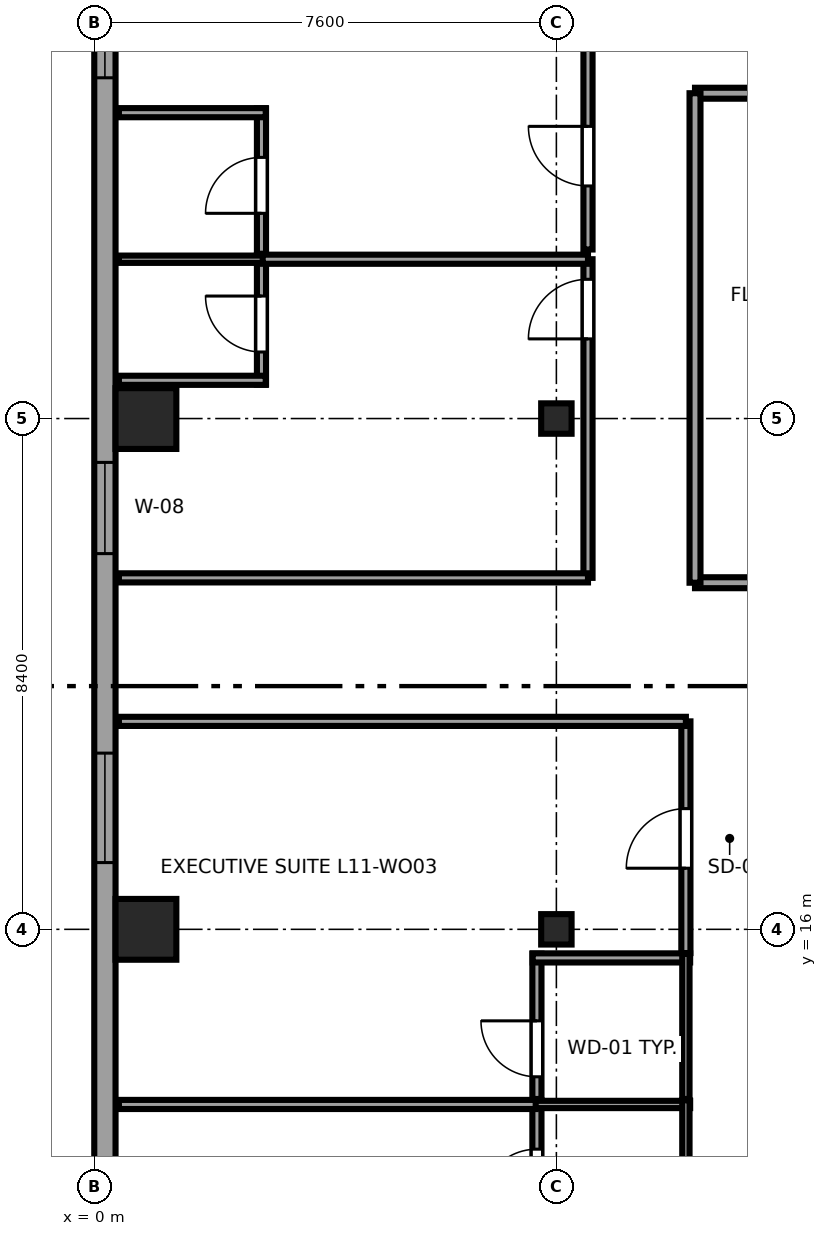
"""IFC4 building model, lengths in metres.
Left out: names, types, materials, properties, quantities, classifications, styles, units other than length and angle.
Written with IfcOpenShell. Run it as: python <this file> out.ifc"""

import sys

from ifc_helpers import new_model, si_unit, direction, frame, frame_2d, origin, origin_2d, place, context, subcontext, project, spatial, rectangle, i_section, extrude, source, transform, mapped, element, fill, save


model = new_model("IFC4")
c1 = context("Model", 3, precision=1e-05, world=origin(), true_north=direction((0.0, 1.0)))
c2 = subcontext(c1, "Body", "Model", "MODEL_VIEW")
j1 = project(units=[si_unit("LENGTHUNIT", "METRE"), si_unit("PLANEANGLEUNIT", "RADIAN")], contexts=[c1])
p1 = place(None, origin())
s1 = spatial("IfcSite", under=j1, at=p1, CompositionType="ELEMENT")
p2 = place(p1, origin())
s2 = spatial("IfcBuilding", under=s1, at=p2, CompositionType="ELEMENT")
p3 = place(p2, frame((0.0, 0.0, 49.75)))
s3 = spatial("IfcBuildingStorey", under=s2, at=p3, CompositionType="ELEMENT", Elevation=49.75)
m1 = source(origin(), c2, "Body", "SweptSolid", [
    extrude(rectangle(XDim=1.0, YDim=1.0, at=origin_2d()), origin(), (0.0, 0.0, 1.0), 3.55),
])
for number, where, z_axis, x_axis in (
    (1, (0.85, 16.0, 0.0), (0.0, 0.0, 1.0), (1.0, 0.0, 0.0)),
    (2, (0.85, 24.4, 0.0), (0.0, 0.0, 1.0), (1.0, 0.0, 0.0)),
):
    element("IfcColumn", number, at=place(p3, frame(where, z_axis=z_axis, x_axis=x_axis)), inside=s3, PredefinedType="COLUMN", context=c2, shape_type="MappedRepresentation", body=[
        mapped(m1, transform((0.0, 0.0, 0.0), x_axis=(1.0, 0.0, 0.0), y_axis=(0.0, 1.0, 0.0), z_axis=(0.0, 0.0, 1.0), scale=1.0)),
    ])
m2 = source(origin(), c2, "Body", "SweptSolid", [
    extrude(i_section(OverallWidth=0.5, OverallDepth=0.5, WebThickness=0.028, FlangeThickness=0.045, at=origin_2d()), origin(), (0.0, 0.0, 1.0), 3.55),
])
for number, where, z_axis, x_axis in (
    (3, (7.6, 16.0, 0.0), (0.0, 0.0, 1.0), (1.0, 0.0, 0.0)),
    (4, (7.6, 24.4, 0.0), (0.0, 0.0, 1.0), (1.0, 0.0, 0.0)),
):
    element("IfcColumn", number, at=place(p3, frame(where, z_axis=z_axis, x_axis=x_axis)), inside=s3, PredefinedType="COLUMN", context=c2, shape_type="MappedRepresentation", body=[
        mapped(m2, transform((0.0, 0.0, 0.0), x_axis=(1.0, 0.0, 0.0), y_axis=(0.0, 1.0, 0.0), z_axis=(0.0, 0.0, 1.0), scale=1.0)),
    ])
p4 = place(p3, frame((0.175, 41.383, 0.0), z_axis=(0.0, 0.0, 1.0), x_axis=(0.0, -1.0, 0.0)))
e5 = element("IfcWall", 5, at=p4, inside=s3, PredefinedType="SOLIDWALL", context=c2, shape_type="SweptSolid", body=[
    extrude(rectangle(XDim=36.766, YDim=0.35, at=frame_2d((18.383, 0.0))), origin(), (0.0, 0.0, 1.0), 3.37),
])
p5 = place(p4, frame((1.676, 0.0, 0.68)))
e6 = element("IfcOpeningElement", 6, at=p5, cuts=e5, PredefinedType="OPENING", context=c2, shape_type="SweptSolid", body=[
    extrude(rectangle(XDim=1.8, YDim=1.85, at=frame_2d((0.9, 0.925))), frame((0.0, 0.185, 0.0), z_axis=(0.0, -1.0, 0.0), x_axis=(1.0, 0.0, 0.0)), (0.0, 0.0, 1.0), 0.37),
])
p6 = place(p4, frame((4.578, 0.0, 0.68)))
e7 = element("IfcOpeningElement", 7, at=p6, cuts=e5, PredefinedType="OPENING", context=c2, shape_type="SweptSolid", body=[
    extrude(rectangle(XDim=1.8, YDim=1.85, at=frame_2d((0.9, 0.925))), frame((0.0, 0.185, 0.0), z_axis=(0.0, -1.0, 0.0), x_axis=(1.0, 0.0, 0.0)), (0.0, 0.0, 1.0), 0.37),
])
p7 = place(p4, frame((9.579, 0.0, 0.68)))
e8 = element("IfcOpeningElement", 8, at=p7, cuts=e5, PredefinedType="OPENING", context=c2, shape_type="SweptSolid", body=[
    extrude(rectangle(XDim=1.8, YDim=1.85, at=frame_2d((0.9, 0.925))), frame((0.0, 0.185, 0.0), z_axis=(0.0, -1.0, 0.0), x_axis=(1.0, 0.0, 0.0)), (0.0, 0.0, 1.0), 0.37),
])
p8 = place(p4, frame((22.485, 0.0, 0.68)))
e9 = element("IfcOpeningElement", 9, at=p8, cuts=e5, PredefinedType="OPENING", context=c2, shape_type="SweptSolid", body=[
    extrude(rectangle(XDim=1.8, YDim=1.85, at=frame_2d((0.9, 0.925))), frame((0.0, 0.185, 0.0), z_axis=(0.0, -1.0, 0.0), x_axis=(1.0, 0.0, 0.0)), (0.0, 0.0, 1.0), 0.37),
])
p9 = place(p4, frame((29.338, 0.0, 0.68)))
e10 = element("IfcOpeningElement", 10, at=p9, cuts=e5, PredefinedType="OPENING", context=c2, shape_type="SweptSolid", body=[
    extrude(rectangle(XDim=1.8, YDim=1.85, at=frame_2d((0.9, 0.925))), frame((0.0, 0.185, 0.0), z_axis=(0.0, -1.0, 0.0), x_axis=(1.0, 0.0, 0.0)), (0.0, 0.0, 1.0), 0.37),
])
p10 = place(p4, frame((34.879, 0.0, 0.62)))
e11 = element("IfcOpeningElement", 11, at=p10, cuts=e5, PredefinedType="OPENING", context=c2, shape_type="SweptSolid", body=[
    extrude(rectangle(XDim=1.5, YDim=1.55, at=frame_2d((0.75, 0.775))), frame((0.0, 0.185, 0.0), z_axis=(0.0, -1.0, 0.0), x_axis=(1.0, 0.0, 0.0)), (0.0, 0.0, 1.0), 0.37),
])
p11 = place(p4, frame((17.704, 0.0, 0.62)))
e12 = element("IfcOpeningElement", 12, at=p11, cuts=e5, PredefinedType="OPENING", context=c2, shape_type="SweptSolid", body=[
    extrude(rectangle(XDim=1.5, YDim=1.55, at=frame_2d((0.75, 0.775))), frame((0.0, 0.185, 0.0), z_axis=(0.0, -1.0, 0.0), x_axis=(1.0, 0.0, 0.0)), (0.0, 0.0, 1.0), 0.37),
])
p12 = place(p3, frame((7.28, 10.8, 0.0), z_axis=(0.0, 0.0, 1.0), x_axis=(0.0, 1.0, 0.0)))
e13 = element("IfcWall", 13, at=p12, inside=s3, PredefinedType="PARTITIONING", context=c2, shape_type="SweptSolid", body=[
    extrude(rectangle(XDim=2.39, YDim=0.15, at=frame_2d((1.195, 0.0))), origin(), (0.0, 0.0, 1.0), 3.37),
])
p13 = place(p12, frame((0.665, 0.0, 0.0)))
e14 = element("IfcOpeningElement", 14, at=p13, cuts=e13, PredefinedType="OPENING", context=c2, shape_type="SweptSolid", body=[
    extrude(rectangle(XDim=0.92, YDim=2.01, at=frame_2d((0.46, 1.005))), frame((0.0, 0.085, 0.0), z_axis=(0.0, -1.0, 0.0), x_axis=(1.0, 0.0, 0.0)), (0.0, 0.0, 1.0), 0.17),
])
p14 = place(p3, frame((7.21, 13.12, 0.0), z_axis=(0.0, 0.0, 1.0), x_axis=(1.0, 0.0, 0.0)))
e15 = element("IfcWall", 15, at=p14, inside=s3, PredefinedType="PLUMBINGWALL", context=c2, shape_type="SweptSolid", body=[
    extrude(rectangle(XDim=2.59, YDim=0.12, at=frame_2d((1.295, 0.0))), origin(), (0.0, 0.0, 1.0), 3.37),
])
p15 = place(p3, frame((9.73, 10.8, 0.0), z_axis=(0.0, 0.0, 1.0), x_axis=(0.0, 1.0, 0.0)))
e16 = element("IfcWall", 16, at=p15, inside=s3, PredefinedType="PLUMBINGWALL", context=c2, shape_type="SweptSolid", body=[
    extrude(rectangle(XDim=2.39, YDim=0.12, at=frame_2d((1.195, 0.0))), origin(), (0.0, 0.0, 1.0), 3.37),
])
p16 = place(p3, frame((7.28, 13.21, 0.0), z_axis=(0.0, 0.0, 1.0), x_axis=(0.0, 1.0, 0.0)))
e17 = element("IfcWall", 17, at=p16, inside=s3, PredefinedType="PARTITIONING", context=c2, shape_type="SweptSolid", body=[
    extrude(rectangle(XDim=2.39, YDim=0.15, at=frame_2d((1.195, 0.0))), origin(), (0.0, 0.0, 1.0), 3.37),
])
p17 = place(p16, frame((0.365, 0.0, 0.0)))
e18 = element("IfcOpeningElement", 18, at=p17, cuts=e17, PredefinedType="OPENING", context=c2, shape_type="SweptSolid", body=[
    extrude(rectangle(XDim=0.92, YDim=2.01, at=frame_2d((0.46, 1.005))), frame((0.0, 0.085, 0.0), z_axis=(0.0, -1.0, 0.0), x_axis=(1.0, 0.0, 0.0)), (0.0, 0.0, 1.0), 0.17),
])
p18 = place(p3, frame((7.21, 15.53, 0.0), z_axis=(0.0, 0.0, 1.0), x_axis=(1.0, 0.0, 0.0)))
e19 = element("IfcWall", 19, at=p18, inside=s3, PredefinedType="PARTITIONING", context=c2, shape_type="SweptSolid", body=[
    extrude(rectangle(XDim=2.59, YDim=0.15, at=frame_2d((1.295, 0.0))), origin(), (0.0, 0.0, 1.0), 3.37),
])
p19 = place(p3, frame((9.73, 13.21, 0.0), z_axis=(0.0, 0.0, 1.0), x_axis=(0.0, 1.0, 0.0)))
e20 = element("IfcWall", 20, at=p19, inside=s3, PredefinedType="PLUMBINGWALL", context=c2, shape_type="SweptSolid", body=[
    extrude(rectangle(XDim=2.39, YDim=0.12, at=frame_2d((1.195, 0.0))), origin(), (0.0, 0.0, 1.0), 3.37),
])
p20 = place(p3, frame((2.75, 24.959, 0.0), z_axis=(0.0, 0.0, 1.0), x_axis=(0.0, 1.0, 0.0)))
e21 = element("IfcWall", 21, at=p20, inside=s3, PredefinedType="PARTITIONING", context=c2, shape_type="SweptSolid", body=[
    extrude(rectangle(XDim=2.131, YDim=0.15, at=frame_2d((1.065, 0.0))), origin(), (0.0, 0.0, 1.0), 3.37),
])
p21 = place(p20, frame((0.535, 0.0, 0.0)))
e22 = element("IfcOpeningElement", 22, at=p21, cuts=e21, PredefinedType="OPENING", context=c2, shape_type="SweptSolid", body=[
    extrude(rectangle(XDim=0.92, YDim=2.01, at=frame_2d((0.46, 1.005))), frame((0.0, 0.085, 0.0), z_axis=(0.0, -1.0, 0.0), x_axis=(1.0, 0.0, 0.0)), (0.0, 0.0, 1.0), 0.17),
])
p22 = place(p3, frame((0.405, 25.029, 0.0), z_axis=(0.0, 0.0, 1.0), x_axis=(1.0, 0.0, 0.0)))
e23 = element("IfcWall", 23, at=p22, inside=s3, PredefinedType="PARTITIONING", context=c2, shape_type="SweptSolid", body=[
    extrude(rectangle(XDim=2.415, YDim=0.15, at=frame_2d((1.208, 0.0))), origin(), (0.0, 0.0, 1.0), 3.37),
])
p23 = place(p3, frame((0.405, 27.02, 0.0), z_axis=(0.0, 0.0, 1.0), x_axis=(1.0, 0.0, 0.0)))
e24 = element("IfcWall", 24, at=p23, inside=s3, PredefinedType="PLUMBINGWALL", context=c2, shape_type="SweptSolid", body=[
    extrude(rectangle(XDim=2.415, YDim=0.12, at=frame_2d((1.208, 0.0))), origin(), (0.0, 0.0, 1.0), 3.37),
])
p24 = place(p3, frame((2.75, 27.11, 0.0), z_axis=(0.0, 0.0, 1.0), x_axis=(0.0, 1.0, 0.0)))
e25 = element("IfcWall", 25, at=p24, inside=s3, PredefinedType="PARTITIONING", context=c2, shape_type="SweptSolid", body=[
    extrude(rectangle(XDim=2.39, YDim=0.15, at=frame_2d((1.195, 0.0))), origin(), (0.0, 0.0, 1.0), 3.37),
])
p25 = place(p24, frame((0.665, 0.0, 0.0)))
e26 = element("IfcOpeningElement", 26, at=p25, cuts=e25, PredefinedType="OPENING", context=c2, shape_type="SweptSolid", body=[
    extrude(rectangle(XDim=0.92, YDim=2.01, at=frame_2d((0.46, 1.005))), frame((0.0, 0.085, 0.0), z_axis=(0.0, -1.0, 0.0), x_axis=(1.0, 0.0, 0.0)), (0.0, 0.0, 1.0), 0.17),
])
p26 = place(p3, frame((0.405, 29.43, 0.0), z_axis=(0.0, 0.0, 1.0), x_axis=(1.0, 0.0, 0.0)))
e27 = element("IfcWall", 27, at=p26, inside=s3, PredefinedType="PARTITIONING", context=c2, shape_type="SweptSolid", body=[
    extrude(rectangle(XDim=2.415, YDim=0.15, at=frame_2d((1.208, 0.0))), origin(), (0.0, 0.0, 1.0), 3.37),
])
p27 = place(p3, frame((0.405, 13.12, 0.0), z_axis=(0.0, 0.0, 1.0), x_axis=(1.0, 0.0, 0.0)))
e28 = element("IfcWall", 28, at=p27, inside=s3, PredefinedType="PARTITIONING", context=c2, shape_type="SweptSolid", body=[
    extrude(rectangle(XDim=6.855, YDim=0.15, at=frame_2d((3.427, 0.0))), origin(), (0.0, 0.0, 1.0), 3.37),
])
p28 = place(p3, frame((9.73, 15.61, 0.0), z_axis=(0.0, 0.0, 1.0), x_axis=(0.0, 1.0, 0.0)))
e29 = element("IfcWall", 29, at=p28, inside=s3, PredefinedType="PARTITIONING", context=c2, shape_type="SweptSolid", body=[
    extrude(rectangle(XDim=3.81, YDim=0.15, at=frame_2d((1.905, 0.0))), origin(), (0.0, 0.0, 1.0), 3.37),
])
p29 = place(p28, frame((1.395, 0.0, 0.0)))
e30 = element("IfcOpeningElement", 30, at=p29, cuts=e29, PredefinedType="OPENING", context=c2, shape_type="SweptSolid", body=[
    extrude(rectangle(XDim=0.98, YDim=2.12, at=frame_2d((0.49, 1.06))), frame((0.0, 0.085, 0.0), z_axis=(0.0, -1.0, 0.0), x_axis=(1.0, 0.0, 0.0)), (0.0, 0.0, 1.0), 0.17),
])
p30 = place(p3, frame((0.405, 19.42, 0.0), z_axis=(0.0, 0.0, 1.0), x_axis=(1.0, 0.0, 0.0)))
e31 = element("IfcWall", 31, at=p30, inside=s3, PredefinedType="PARTITIONING", context=c2, shape_type="SweptSolid", body=[
    extrude(rectangle(XDim=9.325, YDim=0.15, at=frame_2d((4.663, 0.0))), origin(), (0.0, 0.0, 1.0), 3.37),
])
p31 = place(p3, frame((8.12, 21.78, 0.0), z_axis=(0.0, 0.0, 1.0), x_axis=(0.0, 1.0, 0.0)))
e32 = element("IfcWall", 32, at=p31, inside=s3, PredefinedType="PARTITIONING", context=c2, shape_type="SweptSolid", body=[
    extrude(rectangle(XDim=5.24, YDim=0.15, at=frame_2d((2.62, 0.0))), origin(), (0.0, 0.0, 1.0), 3.37),
])
p32 = place(p31, frame((3.93, 0.0, 0.0)))
e33 = element("IfcOpeningElement", 33, at=p32, cuts=e32, PredefinedType="OPENING", context=c2, shape_type="SweptSolid", body=[
    extrude(rectangle(XDim=0.98, YDim=2.12, at=frame_2d((0.49, 1.06))), frame((0.0, 0.085, 0.0), z_axis=(0.0, -1.0, 0.0), x_axis=(1.0, 0.0, 0.0)), (0.0, 0.0, 1.0), 0.17),
])
p33 = place(p3, frame((0.405, 21.78, 0.0), z_axis=(0.0, 0.0, 1.0), x_axis=(1.0, 0.0, 0.0)))
e34 = element("IfcWall", 34, at=p33, inside=s3, PredefinedType="PARTITIONING", context=c2, shape_type="SweptSolid", body=[
    extrude(rectangle(XDim=7.715, YDim=0.15, at=frame_2d((3.857, 0.0))), origin(), (0.0, 0.0, 1.0), 3.37),
])
p34 = place(p3, frame((2.77, 27.02, 0.0), z_axis=(0.0, 0.0, 1.0), x_axis=(1.0, 0.0, 0.0)))
e35 = element("IfcWall", 35, at=p34, inside=s3, PredefinedType="PARTITIONING", context=c2, shape_type="SweptSolid", body=[
    extrude(rectangle(XDim=5.35, YDim=0.15, at=frame_2d((2.675, 0.0))), origin(), (0.0, 0.0, 1.0), 3.37),
])
p35 = place(p3, frame((8.12, 27.18, 0.0), z_axis=(0.0, 0.0, 1.0), x_axis=(0.0, 1.0, 0.0)))
e36 = element("IfcWall", 36, at=p35, inside=s3, PredefinedType="PARTITIONING", context=c2, shape_type="SweptSolid", body=[
    extrude(rectangle(XDim=18.415, YDim=0.15, at=frame_2d((9.208, 0.0))), origin(), (0.0, 0.0, 1.0), 3.37),
])
p36 = place(p35, frame((1.045, 0.0, 0.0)))
e37 = element("IfcOpeningElement", 37, at=p36, cuts=e36, PredefinedType="OPENING", context=c2, shape_type="SweptSolid", body=[
    extrude(rectangle(XDim=0.98, YDim=2.12, at=frame_2d((0.49, 1.06))), frame((0.0, 0.085, 0.0), z_axis=(0.0, -1.0, 0.0), x_axis=(1.0, 0.0, 0.0)), (0.0, 0.0, 1.0), 0.17),
])
p37 = place(p3, frame((9.88, 21.7, 0.0), z_axis=(0.0, 0.0, 1.0), x_axis=(1.0, 0.0, 0.0)))
e38 = element("IfcWall", 38, at=p37, inside=s3, PredefinedType="PARTITIONING", context=c2, shape_type="SweptSolid", body=[
    extrude(rectangle(XDim=4.22, YDim=0.18, at=frame_2d((2.11, 0.0))), origin(), (0.0, 0.0, 1.0), 3.37),
])
p38 = place(p37, frame((1.285, 0.0, 0.0)))
e39 = element("IfcOpeningElement", 39, at=p38, cuts=e38, PredefinedType="OPENING", context=c2, shape_type="SweptSolid", body=[
    extrude(rectangle(XDim=1.65, YDim=2.15, at=frame_2d((0.825, 1.075))), frame((0.0, 0.1, 0.0), z_axis=(0.0, -1.0, 0.0), x_axis=(1.0, 0.0, 0.0)), (0.0, 0.0, 1.0), 0.2),
])
p39 = place(p3, frame((9.88, 29.75, 0.0), z_axis=(0.0, 0.0, 1.0), x_axis=(1.0, 0.0, 0.0)))
e40 = element("IfcWall", 40, at=p39, inside=s3, PredefinedType="PARTITIONING", context=c2, shape_type="SweptSolid", body=[
    extrude(rectangle(XDim=4.22, YDim=0.18, at=frame_2d((2.11, 0.0))), origin(), (0.0, 0.0, 1.0), 3.37),
])
p40 = place(p3, frame((9.88, 21.7, 0.0), z_axis=(0.0, 0.0, 1.0), x_axis=(0.0, 1.0, 0.0)))
e41 = element("IfcWall", 41, at=p40, inside=s3, PredefinedType="PARTITIONING", context=c2, shape_type="SweptSolid", body=[
    extrude(rectangle(XDim=8.05, YDim=0.18, at=frame_2d((4.025, 0.0))), origin(), (0.0, 0.0, 1.0), 3.37),
])
m3 = source(origin(), c2, "Body", "SweptSolid", [
    extrude(rectangle(XDim=1.8, YDim=1.85, at=frame_2d((0.9, 0.925))), frame((0.0, 0.09, 0.0), z_axis=(0.0, -1.0, 0.0), x_axis=(1.0, 0.0, 0.0)), (0.0, 0.0, 1.0), 0.06),
])
p41 = place(p7, origin())
e42 = element("IfcWindow", 42, at=p41, inside=s3, PartitioningType="TRIPLE_PANEL_HORIZONTAL", PredefinedType="WINDOW", context=c2, shape_type="MappedRepresentation", body=[
    mapped(m3, transform((0.0, 0.0, 0.0), x_axis=(1.0, 0.0, 0.0), y_axis=(0.0, 1.0, 0.0), z_axis=(0.0, 0.0, 1.0), scale=1.0)),
])
fill(e8, e42)
p42 = place(p8, origin())
e43 = element("IfcWindow", 43, at=p42, inside=s3, PartitioningType="TRIPLE_PANEL_HORIZONTAL", PredefinedType="WINDOW", context=c2, shape_type="MappedRepresentation", body=[
    mapped(m3, transform((0.0, 0.0, 0.0), x_axis=(1.0, 0.0, 0.0), y_axis=(0.0, 1.0, 0.0), z_axis=(0.0, 0.0, 1.0), scale=1.0)),
])
fill(e9, e43)
m4 = source(origin(), c2, "Body", "SweptSolid", [
    extrude(rectangle(XDim=1.5, YDim=1.55, at=frame_2d((0.75, 0.775))), frame((0.0, 0.09, 0.0), z_axis=(0.0, -1.0, 0.0), x_axis=(1.0, 0.0, 0.0)), (0.0, 0.0, 1.0), 0.06),
])
p43 = place(p11, origin())
e44 = element("IfcWindow", 44, at=p43, inside=s3, PartitioningType="SINGLE_PANEL", PredefinedType="WINDOW", context=c2, shape_type="MappedRepresentation", body=[
    mapped(m4, transform((0.0, 0.0, 0.0), x_axis=(1.0, 0.0, 0.0), y_axis=(0.0, 1.0, 0.0), z_axis=(0.0, 0.0, 1.0), scale=1.0)),
])
fill(e12, e44)
m5 = source(origin(), c2, "Body", "SweptSolid", [
    extrude(rectangle(XDim=0.92, YDim=2.01, at=frame_2d((0.46, 1.005))), frame((0.0, 0.025, 0.0), z_axis=(0.0, -1.0, 0.0), x_axis=(1.0, 0.0, 0.0)), (0.0, 0.0, 1.0), 0.05),
])
p44 = place(p13, origin())
e45 = element("IfcDoor", 45, at=p44, inside=s3, OperationType="SINGLE_SWING_LEFT", PredefinedType="DOOR", context=c2, shape_type="MappedRepresentation", body=[
    mapped(m5, transform((0.0, 0.0, 0.0), x_axis=(1.0, 0.0, 0.0), y_axis=(0.0, 1.0, 0.0), z_axis=(0.0, 0.0, 1.0), scale=1.0)),
])
fill(e14, e45)
p45 = place(p17, origin())
e46 = element("IfcDoor", 46, at=p45, inside=s3, OperationType="SINGLE_SWING_RIGHT", PredefinedType="DOOR", context=c2, shape_type="MappedRepresentation", body=[
    mapped(m5, transform((0.0, 0.0, 0.0), x_axis=(1.0, 0.0, 0.0), y_axis=(0.0, 1.0, 0.0), z_axis=(0.0, 0.0, 1.0), scale=1.0)),
])
fill(e18, e46)
p46 = place(p21, origin())
e47 = element("IfcDoor", 47, at=p46, inside=s3, OperationType="SINGLE_SWING_RIGHT", PredefinedType="DOOR", context=c2, shape_type="MappedRepresentation", body=[
    mapped(m5, transform((0.0, 0.0, 0.0), x_axis=(1.0, 0.0, 0.0), y_axis=(0.0, 1.0, 0.0), z_axis=(0.0, 0.0, 1.0), scale=1.0)),
])
fill(e22, e47)
p47 = place(p25, origin())
e48 = element("IfcDoor", 48, at=p47, inside=s3, OperationType="SINGLE_SWING_LEFT", PredefinedType="DOOR", context=c2, shape_type="MappedRepresentation", body=[
    mapped(m5, transform((0.0, 0.0, 0.0), x_axis=(1.0, 0.0, 0.0), y_axis=(0.0, 1.0, 0.0), z_axis=(0.0, 0.0, 1.0), scale=1.0)),
])
fill(e26, e48)
m6 = source(origin(), c2, "Body", "SweptSolid", [
    extrude(rectangle(XDim=0.98, YDim=2.12, at=frame_2d((0.49, 1.06))), frame((0.0, 0.025, 0.0), z_axis=(0.0, -1.0, 0.0), x_axis=(1.0, 0.0, 0.0)), (0.0, 0.0, 1.0), 0.05),
])
p48 = place(p29, origin())
e49 = element("IfcDoor", 49, at=p48, inside=s3, OperationType="SINGLE_SWING_LEFT", PredefinedType="DOOR", context=c2, shape_type="MappedRepresentation", body=[
    mapped(m6, transform((0.0, 0.0, 0.0), x_axis=(1.0, 0.0, 0.0), y_axis=(0.0, 1.0, 0.0), z_axis=(0.0, 0.0, 1.0), scale=1.0)),
])
fill(e30, e49)
p49 = place(p32, origin())
e50 = element("IfcDoor", 50, at=p49, inside=s3, OperationType="SINGLE_SWING_LEFT", PredefinedType="DOOR", context=c2, shape_type="MappedRepresentation", body=[
    mapped(m6, transform((0.0, 0.0, 0.0), x_axis=(1.0, 0.0, 0.0), y_axis=(0.0, 1.0, 0.0), z_axis=(0.0, 0.0, 1.0), scale=1.0)),
])
fill(e33, e50)
p50 = place(p36, origin())
e51 = element("IfcDoor", 51, at=p50, inside=s3, OperationType="SINGLE_SWING_RIGHT", PredefinedType="DOOR", context=c2, shape_type="MappedRepresentation", body=[
    mapped(m6, transform((0.0, 0.0, 0.0), x_axis=(1.0, 0.0, 0.0), y_axis=(0.0, 1.0, 0.0), z_axis=(0.0, 0.0, 1.0), scale=1.0)),
])
fill(e37, e51)
save(model, sys.argv[1])
